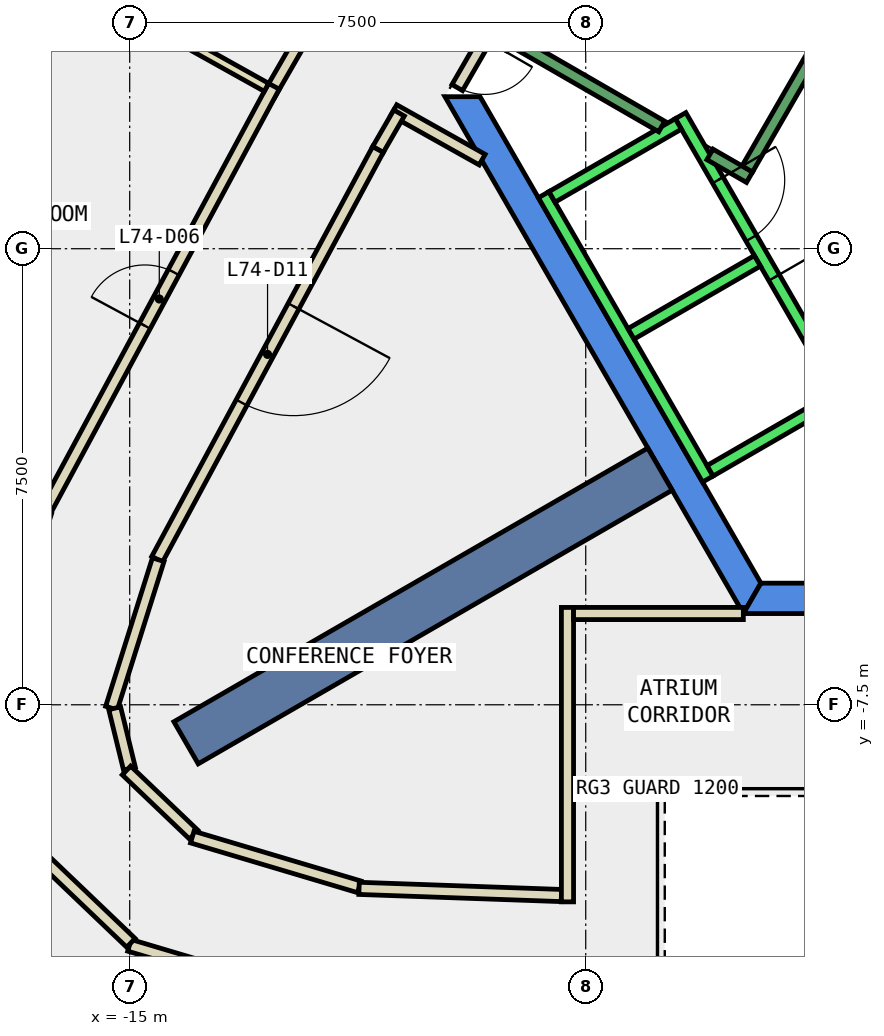
"""IFC4 building model, lengths in metres.
Left out: names, types, materials, properties, quantities, classifications, styles, units other than length and angle.
Written with IfcOpenShell. Run it as: python <this file> out.ifc"""

import sys

from ifc_helpers import new_model, si_unit, direction, frame, frame_2d, origin, place, context, subcontext, project, spatial, polyline, rectangle, outline, extrude, element, fill, save


model = new_model("IFC4")
c1 = context("Model", 3, precision=1e-05, world=origin(), true_north=direction((0.0, 1.0)))
c2 = subcontext(c1, "Body", "Model", "MODEL_VIEW")
j1 = project(units=[si_unit("LENGTHUNIT", "METRE"), si_unit("PLANEANGLEUNIT", "RADIAN")], contexts=[c1])
p1 = place(None, origin())
s1 = spatial("IfcSite", under=j1, at=p1, CompositionType="ELEMENT")
p2 = place(p1, origin())
s2 = spatial("IfcBuilding", under=s1, at=p2, CompositionType="ELEMENT")
p3 = place(p2, frame((0.0, 0.0, 315.2)))
s3 = spatial("IfcBuildingStorey", under=s2, at=p3, CompositionType="ELEMENT", Elevation=315.2)
p4 = place(p3, frame((0.0, 0.0, -0.34)))
e1 = element("IfcWall", 1, at=p4, inside=s3, PredefinedType="SHEAR", context=c2, shape_type="SweptSolid", body=[
    extrude(outline(polyline([(-9.815, 2.5), (-4.907, -6.0), (-4.619, -5.5), (-9.238, 2.5), (-9.815, 2.5)])), origin(), (0.0, 0.0, 1.0), 3.6),
])
p5 = place(p3, frame((0.0, 0.0, -0.34)))
e2 = element("IfcWall", 2, at=p5, inside=s3, PredefinedType="SHEAR", context=c2, shape_type="SweptSolid", body=[
    extrude(outline(polyline([(3.75, -6.0), (3.75, -5.5), (-4.619, -5.5), (-4.907, -6.0), (3.75, -6.0)])), origin(), (0.0, 0.0, 1.0), 3.6),
])
p6 = place(p3, frame((-6.279, -3.625, -0.34), z_axis=(0.0, 0.0, 1.0), x_axis=(-0.866017533419, -0.500013631625, 0.0)))
e3 = element("IfcWall", 3, at=p6, inside=s3, PredefinedType="SHEAR", context=c2, shape_type="SweptSolid", body=[
    extrude(rectangle(XDim=9.0, YDim=0.8, at=frame_2d((4.5, 0.0))), origin(), (0.0, 0.0, 1.0), 3.6),
])
p7 = place(p3, frame((-9.203, 1.465, 0.0), z_axis=(0.0, 0.0, 1.0), x_axis=(-0.872341127106, 0.488897696823, 0.0)))
e4 = element("IfcWall", 4, at=p7, inside=s3, PredefinedType="PARTITIONING", context=c2, shape_type="SweptSolid", body=[
    extrude(rectangle(XDim=1.667, YDim=0.2, at=frame_2d((0.833, 0.0))), origin(), (0.0, 0.0, 1.0), 3.26),
])
p8 = place(p3, frame((-10.57, 2.232, 0.0), z_axis=(0.0, 0.0, 1.0), x_axis=(-0.500037208726, -0.86600392025, 0.0)))
e5 = element("IfcWall", 5, at=p8, inside=s3, PredefinedType="PARTITIONING", context=c2, shape_type="SweptSolid", body=[
    extrude(rectangle(XDim=0.694, YDim=0.2, at=frame_2d((0.347, 0.0))), origin(), (0.0, 0.0, 1.0), 3.26),
])
p9 = place(p3, frame((-10.917, 1.631, 0.0), z_axis=(0.0, 0.0, 1.0), x_axis=(-0.47449538478, -0.880257990491, 0.0)))
e6 = element("IfcWall", 6, at=p9, inside=s3, PredefinedType="PARTITIONING", context=c2, shape_type="SweptSolid", body=[
    extrude(rectangle(XDim=7.655, YDim=0.2, at=frame_2d((3.827, 0.0))), origin(), (0.0, 0.0, 1.0), 3.26),
])
p10 = place(p9, frame((2.927, 0.0, 0.0)))
e7 = element("IfcOpeningElement", 7, at=p10, cuts=e6, PredefinedType="OPENING", context=c2, shape_type="SweptSolid", body=[
    extrude(rectangle(XDim=1.8, YDim=2.1, at=frame_2d((0.9, 1.05))), frame((0.0, 0.11, 0.0), z_axis=(0.0, -1.0, 0.0), x_axis=(1.0, 0.0, 0.0)), (0.0, 0.0, 1.0), 0.22),
])
p11 = place(p3, frame((-14.531, -5.114, 0.0), z_axis=(0.0, 0.0, 1.0), x_axis=(-0.300501248013, -0.953781421471, 0.0)))
e8 = element("IfcWall", 8, at=p11, inside=s3, PredefinedType="PARTITIONING", context=c2, shape_type="SweptSolid", body=[
    extrude(rectangle(XDim=2.559, YDim=0.2, at=frame_2d((1.28, 0.0))), origin(), (0.0, 0.0, 1.0), 3.26),
])
p12 = place(p3, frame((-15.247, -7.557, 0.0), z_axis=(0.0, 0.0, 1.0), x_axis=(0.237373129266, -0.971418549083, 0.0)))
e9 = element("IfcWall", 9, at=p12, inside=s3, PredefinedType="PARTITIONING", context=c2, shape_type="SweptSolid", body=[
    extrude(rectangle(XDim=1.024, YDim=0.2, at=frame_2d((0.512, 0.0))), origin(), (0.0, 0.0, 1.0), 3.26),
])
p13 = place(p3, frame((-15.053, -8.58, 0.0), z_axis=(0.0, 0.0, 1.0), x_axis=(0.723283043556, -0.690551691696, 0.0)))
e10 = element("IfcWall", 10, at=p13, inside=s3, PredefinedType="PARTITIONING", context=c2, shape_type="SweptSolid", body=[
    extrude(rectangle(XDim=1.529, YDim=0.2, at=frame_2d((0.765, 0.0))), origin(), (0.0, 0.0, 1.0), 3.26),
])
p14 = place(p3, frame((-13.971, -9.676, 0.0), z_axis=(0.0, 0.0, 1.0), x_axis=(0.958417413979, -0.285370041492, 0.0)))
e11 = element("IfcWall", 11, at=p14, inside=s3, PredefinedType="PARTITIONING", context=c2, shape_type="SweptSolid", body=[
    extrude(rectangle(XDim=2.866, YDim=0.2, at=frame_2d((1.433, 0.0))), origin(), (0.0, 0.0, 1.0), 3.26),
])
p15 = place(p3, frame((-11.228, -10.519, 0.0), z_axis=(0.0, 0.0, 1.0), x_axis=(0.999372900517, -0.035409119054, 0.0)))
e12 = element("IfcWall", 12, at=p15, inside=s3, PredefinedType="PARTITIONING", context=c2, shape_type="SweptSolid", body=[
    extrude(rectangle(XDim=3.33, YDim=0.2, at=frame_2d((1.665, 0.0))), origin(), (0.0, 0.0, 1.0), 3.26),
])
p16 = place(p3, frame((-12.701, 2.54, 0.0), z_axis=(0.0, 0.0, 1.0), x_axis=(0.499946799636, 0.86605611685, 0.0)))
e13 = element("IfcWall", 13, at=p16, inside=s3, PredefinedType="PARTITIONING", context=c2, shape_type="SweptSolid", body=[
    extrude(rectangle(XDim=8.227, YDim=0.2, at=frame_2d((4.114, 0.0))), origin(), (0.0, 0.0, 1.0), 3.26),
])
p17 = place(p16, frame((3.613, 0.0, 0.0)))
e14 = element("IfcOpeningElement", 14, at=p17, cuts=e13, PredefinedType="OPENING", context=c2, shape_type="SweptSolid", body=[
    extrude(rectangle(XDim=1.0, YDim=2.1, at=frame_2d((0.5, 1.05))), frame((0.0, 0.11, 0.0), z_axis=(0.0, -1.0, 0.0), x_axis=(1.0, 0.0, 0.0)), (0.0, 0.0, 1.0), 0.22),
])
p18 = place(p3, frame((-16.399, -4.325, 0.0), z_axis=(0.0, 0.0, 1.0), x_axis=(0.474489967676, 0.880260910512, 0.0)))
e15 = element("IfcWall", 15, at=p18, inside=s3, PredefinedType="PARTITIONING", context=c2, shape_type="SweptSolid", body=[
    extrude(rectangle(XDim=7.948, YDim=0.2, at=frame_2d((3.974, 0.0))), origin(), (0.0, 0.0, 1.0), 3.26),
])
p19 = place(p18, frame((3.474, 0.0, 0.0)))
e16 = element("IfcOpeningElement", 16, at=p19, cuts=e15, PredefinedType="OPENING", context=c2, shape_type="SweptSolid", body=[
    extrude(rectangle(XDim=1.0, YDim=2.1, at=frame_2d((0.5, 1.05))), frame((0.0, 0.11, 0.0), z_axis=(0.0, -1.0, 0.0), x_axis=(1.0, 0.0, 0.0)), (0.0, 0.0, 1.0), 0.22),
])
p20 = place(p3, frame((-11.55, -12.484, 0.0), z_axis=(0.0, 0.0, 1.0), x_axis=(-0.958459796003, 0.285227662485, 0.0)))
e17 = element("IfcWall", 17, at=p20, inside=s3, PredefinedType="PARTITIONING", context=c2, shape_type="SweptSolid", body=[
    extrude(rectangle(XDim=3.604, YDim=0.2, at=frame_2d((1.802, 0.0))), origin(), (0.0, 0.0, 1.0), 3.26),
])
p21 = place(p3, frame((-14.98, -11.415, 0.0), z_axis=(0.0, 0.0, 1.0), x_axis=(-0.723099256445, 0.690744138831, 0.0)))
e18 = element("IfcWall", 18, at=p21, inside=s3, PredefinedType="PARTITIONING", context=c2, shape_type="SweptSolid", body=[
    extrude(rectangle(XDim=2.596, YDim=0.2, at=frame_2d((1.298, 0.0))), origin(), (0.0, 0.0, 1.0), 3.26),
])
p22 = place(p3, frame((-7.8, -10.741, 0.0), z_axis=(0.0, 0.0, 1.0), x_axis=(0.0, 1.0, 0.0)))
e19 = element("IfcWall", 19, at=p22, inside=s3, PredefinedType="PARTITIONING", context=c2, shape_type="SweptSolid", body=[
    extrude(rectangle(XDim=4.842, YDim=0.2, at=frame_2d((2.421, 0.0))), origin(), (0.0, 0.0, 1.0), 3.26),
])
p23 = place(p3, frame((-7.7, -5.999, 0.0), z_axis=(0.0, 0.0, 1.0), x_axis=(1.0, 0.0, 0.0)))
e20 = element("IfcWall", 20, at=p23, inside=s3, PredefinedType="PARTITIONING", context=c2, shape_type="SweptSolid", body=[
    extrude(rectangle(XDim=2.792, YDim=0.2, at=frame_2d((1.396, 0.0))), origin(), (0.0, 0.0, 1.0), 3.26),
])
p24 = place(p3, frame((-12.751, 2.654, 0.0), z_axis=(0.0, 0.0, 1.0), x_axis=(-0.873277679945, 0.487222837837, 0.0)))
e21 = element("IfcWall", 21, at=p24, inside=s3, PredefinedType="PARTITIONING", context=c2, shape_type="SweptSolid", body=[
    extrude(rectangle(XDim=4.38, YDim=0.15, at=frame_2d((2.19, 0.0))), origin(), (0.0, 0.0, 1.0), 3.26),
])
p25 = place(p3, frame((-9.15, 3.452, 0.0), z_axis=(0.0, 0.0, 1.0), x_axis=(-0.500079945886, -0.865979242085, 0.0)))
e22 = element("IfcWall", 22, at=p25, inside=s3, PredefinedType="PARTITIONING", context=c2, shape_type="SweptSolid", body=[
    extrude(rectangle(XDim=0.926, YDim=0.2, at=frame_2d((0.463, 0.0))), origin(), (0.0, 0.0, 1.0), 2.4),
])
p26 = place(p25, frame((0.017, 0.0, 0.0)))
e23 = element("IfcOpeningElement", 23, at=p26, cuts=e22, PredefinedType="OPENING", context=c2, shape_type="SweptSolid", body=[
    extrude(rectangle(XDim=0.9, YDim=2.1, at=frame_2d((0.45, 1.05))), frame((0.0, 0.11, 0.0), z_axis=(0.0, -1.0, 0.0), x_axis=(1.0, 0.0, 0.0)), (0.0, 0.0, 1.0), 0.22),
])
p27 = place(p3, frame((-5.94, 2.188, 0.0), z_axis=(0.0, 0.0, 1.0), x_axis=(0.500034260056, -0.866005622828, 0.0)))
e24 = element("IfcWall", 24, at=p27, inside=s3, PredefinedType="STANDARD", context=c2, shape_type="SweptSolid", body=[
    extrude(rectangle(XDim=5.399, YDim=0.2, at=frame_2d((2.7, 0.0))), origin(), (0.0, 0.0, 1.0), 3.26),
])
p28 = place(p27, frame((3.075, 0.0, 0.0)))
e25 = element("IfcOpeningElement", 25, at=p28, cuts=e24, PredefinedType="OPENING", context=c2, shape_type="SweptSolid", body=[
    extrude(rectangle(XDim=1.1, YDim=2.1, at=frame_2d((0.55, 1.05))), frame((0.0, 0.11, 0.0), z_axis=(0.0, -1.0, 0.0), x_axis=(1.0, 0.0, 0.0)), (0.0, 0.0, 1.0), 0.22),
])
p29 = place(p27, frame((1.225, 0.0, 0.0)))
e26 = element("IfcOpeningElement", 26, at=p29, cuts=e24, PredefinedType="OPENING", context=c2, shape_type="SweptSolid", body=[
    extrude(rectangle(XDim=1.1, YDim=2.1, at=frame_2d((0.55, 1.05))), frame((0.0, 0.11, 0.0), z_axis=(0.0, -1.0, 0.0), x_axis=(1.0, 0.0, 0.0)), (0.0, 0.0, 1.0), 0.22),
])
p30 = place(p3, frame((-8.192, 0.888, 0.0), z_axis=(0.0, 0.0, 1.0), x_axis=(0.500034260056, -0.866005622828, 0.0)))
e27 = element("IfcWall", 27, at=p30, inside=s3, PredefinedType="STANDARD", context=c2, shape_type="SweptSolid", body=[
    extrude(rectangle(XDim=5.399, YDim=0.2, at=frame_2d((2.7, 0.0))), origin(), (0.0, 0.0, 1.0), 3.26),
])
for number, where, z_axis, x_axis in (
    (28, (-5.977, 2.052, 0.0), (0.0, 0.0, 1.0), (-0.866, -0.5, 0.0)),
    (29, (-4.677, -0.2, 0.0), (0.0, 0.0, 1.0), (-0.866, -0.5, 0.0)),
):
    element("IfcWall", number, at=place(p3, frame(where, z_axis=z_axis, x_axis=x_axis)), inside=s3, PredefinedType="STANDARD", context=c2, shape_type="SweptSolid", body=[
        extrude(rectangle(XDim=2.399, YDim=0.2, at=frame_2d((1.2, 0.0))), origin(), (0.0, 0.0, 1.0), 3.26),
    ])
p31 = place(p3, frame((-3.377, -2.452, 0.0), z_axis=(0.0, 0.0, 1.0), x_axis=(-0.865955154139, -0.50012165622, 0.0)))
e30 = element("IfcWall", 30, at=p31, inside=s3, PredefinedType="STANDARD", context=c2, shape_type="SweptSolid", body=[
    extrude(rectangle(XDim=2.4, YDim=0.2, at=frame_2d((1.2, 0.0))), origin(), (0.0, 0.0, 1.0), 3.26),
])
p32 = place(p3, frame((-6.25, 2.01, 0.0), z_axis=(0.0, 0.0, 1.0), x_axis=(-0.86611865017, 0.499838457731, 0.0)))
e31 = element("IfcWall", 31, at=p32, inside=s3, PredefinedType="STANDARD", context=c2, shape_type="SweptSolid", body=[
    extrude(rectangle(XDim=2.733, YDim=0.2, at=frame_2d((1.366, 0.0))), origin(), (0.0, 0.0, 1.0), 3.26),
])
p33 = place(p3, frame((-4.806, 1.176, 0.0), z_axis=(0.0, 0.0, 1.0), x_axis=(-0.866558586415, 0.499075361355, 0.0)))
e32 = element("IfcWall", 32, at=p33, inside=s3, PredefinedType="STANDARD", context=c2, shape_type="SweptSolid", body=[
    extrude(rectangle(XDim=0.751, YDim=0.2, at=frame_2d((0.376, 0.0))), origin(), (0.0, 0.0, 1.0), 3.26),
])
p34 = place(p3, frame((-1.393, 7.288, 0.0), z_axis=(0.0, 0.0, 1.0), x_axis=(-0.499963383562, -0.866046543262, 0.0)))
e33 = element("IfcWall", 33, at=p34, inside=s3, PredefinedType="STANDARD", context=c2, shape_type="SweptSolid", body=[
    extrude(rectangle(XDim=6.9, YDim=0.2, at=frame_2d((3.45, 0.0))), origin(), (0.0, 0.0, 1.0), 3.26),
])
p35 = place(p34, frame((0.45, 0.0, 0.0)))
e34 = element("IfcOpeningElement", 34, at=p35, cuts=e33, PredefinedType="OPENING", context=c2, shape_type="SweptSolid", body=[
    extrude(rectangle(XDim=1.1, YDim=2.2, at=frame_2d((0.55, 1.1))), frame((0.0, 0.11, 0.0), z_axis=(0.0, -1.0, 0.0), x_axis=(1.0, 0.0, 0.0)), (0.0, 0.0, 1.0), 0.22),
])
p36 = place(p19, origin())
e35 = element("IfcDoor", 35, at=p36, inside=s3, OperationType="SINGLE_SWING_LEFT", PredefinedType="DOOR", context=c2, shape_type="SweptSolid", body=[
    extrude(rectangle(XDim=1.0, YDim=2.1, at=frame_2d((0.5, 1.05))), frame((0.0, 0.025, 0.0), z_axis=(0.0, -1.0, 0.0), x_axis=(1.0, 0.0, 0.0)), (0.0, 0.0, 1.0), 0.05),
])
fill(e16, e35)
p37 = place(p10, origin())
e36 = element("IfcDoor", 36, at=p37, inside=s3, OperationType="DOUBLE_DOOR_SINGLE_SWING", PredefinedType="DOOR", context=c2, shape_type="SweptSolid", body=[
    extrude(rectangle(XDim=1.8, YDim=2.1, at=frame_2d((0.9, 1.05))), frame((0.0, 0.025, 0.0), z_axis=(0.0, -1.0, 0.0), x_axis=(1.0, 0.0, 0.0)), (0.0, 0.0, 1.0), 0.05),
])
fill(e7, e36)
p38 = place(p26, origin())
e37 = element("IfcDoor", 37, at=p38, inside=s3, OperationType="SINGLE_SWING_LEFT", PredefinedType="DOOR", context=c2, shape_type="SweptSolid", body=[
    extrude(rectangle(XDim=0.9, YDim=2.1, at=frame_2d((0.45, 1.05))), frame((0.0, 0.025, 0.0), z_axis=(0.0, -1.0, 0.0), x_axis=(1.0, 0.0, 0.0)), (0.0, 0.0, 1.0), 0.05),
])
fill(e23, e37)
p39 = place(p28, origin())
e38 = element("IfcDoor", 38, at=p39, inside=s3, OperationType="SLIDING_TO_LEFT", PredefinedType="DOOR", context=c2, shape_type="SweptSolid", body=[
    extrude(rectangle(XDim=1.1, YDim=2.1, at=frame_2d((0.55, 1.05))), frame((0.0, 0.025, 0.0), z_axis=(0.0, -1.0, 0.0), x_axis=(1.0, 0.0, 0.0)), (0.0, 0.0, 1.0), 0.05),
])
fill(e25, e38)
p40 = place(p29, origin())
e39 = element("IfcDoor", 39, at=p40, inside=s3, OperationType="SLIDING_TO_LEFT", PredefinedType="DOOR", context=c2, shape_type="SweptSolid", body=[
    extrude(rectangle(XDim=1.1, YDim=2.1, at=frame_2d((0.55, 1.05))), frame((0.0, 0.025, 0.0), z_axis=(0.0, -1.0, 0.0), x_axis=(1.0, 0.0, 0.0)), (0.0, 0.0, 1.0), 0.05),
])
fill(e26, e39)
save(model, sys.argv[1])
